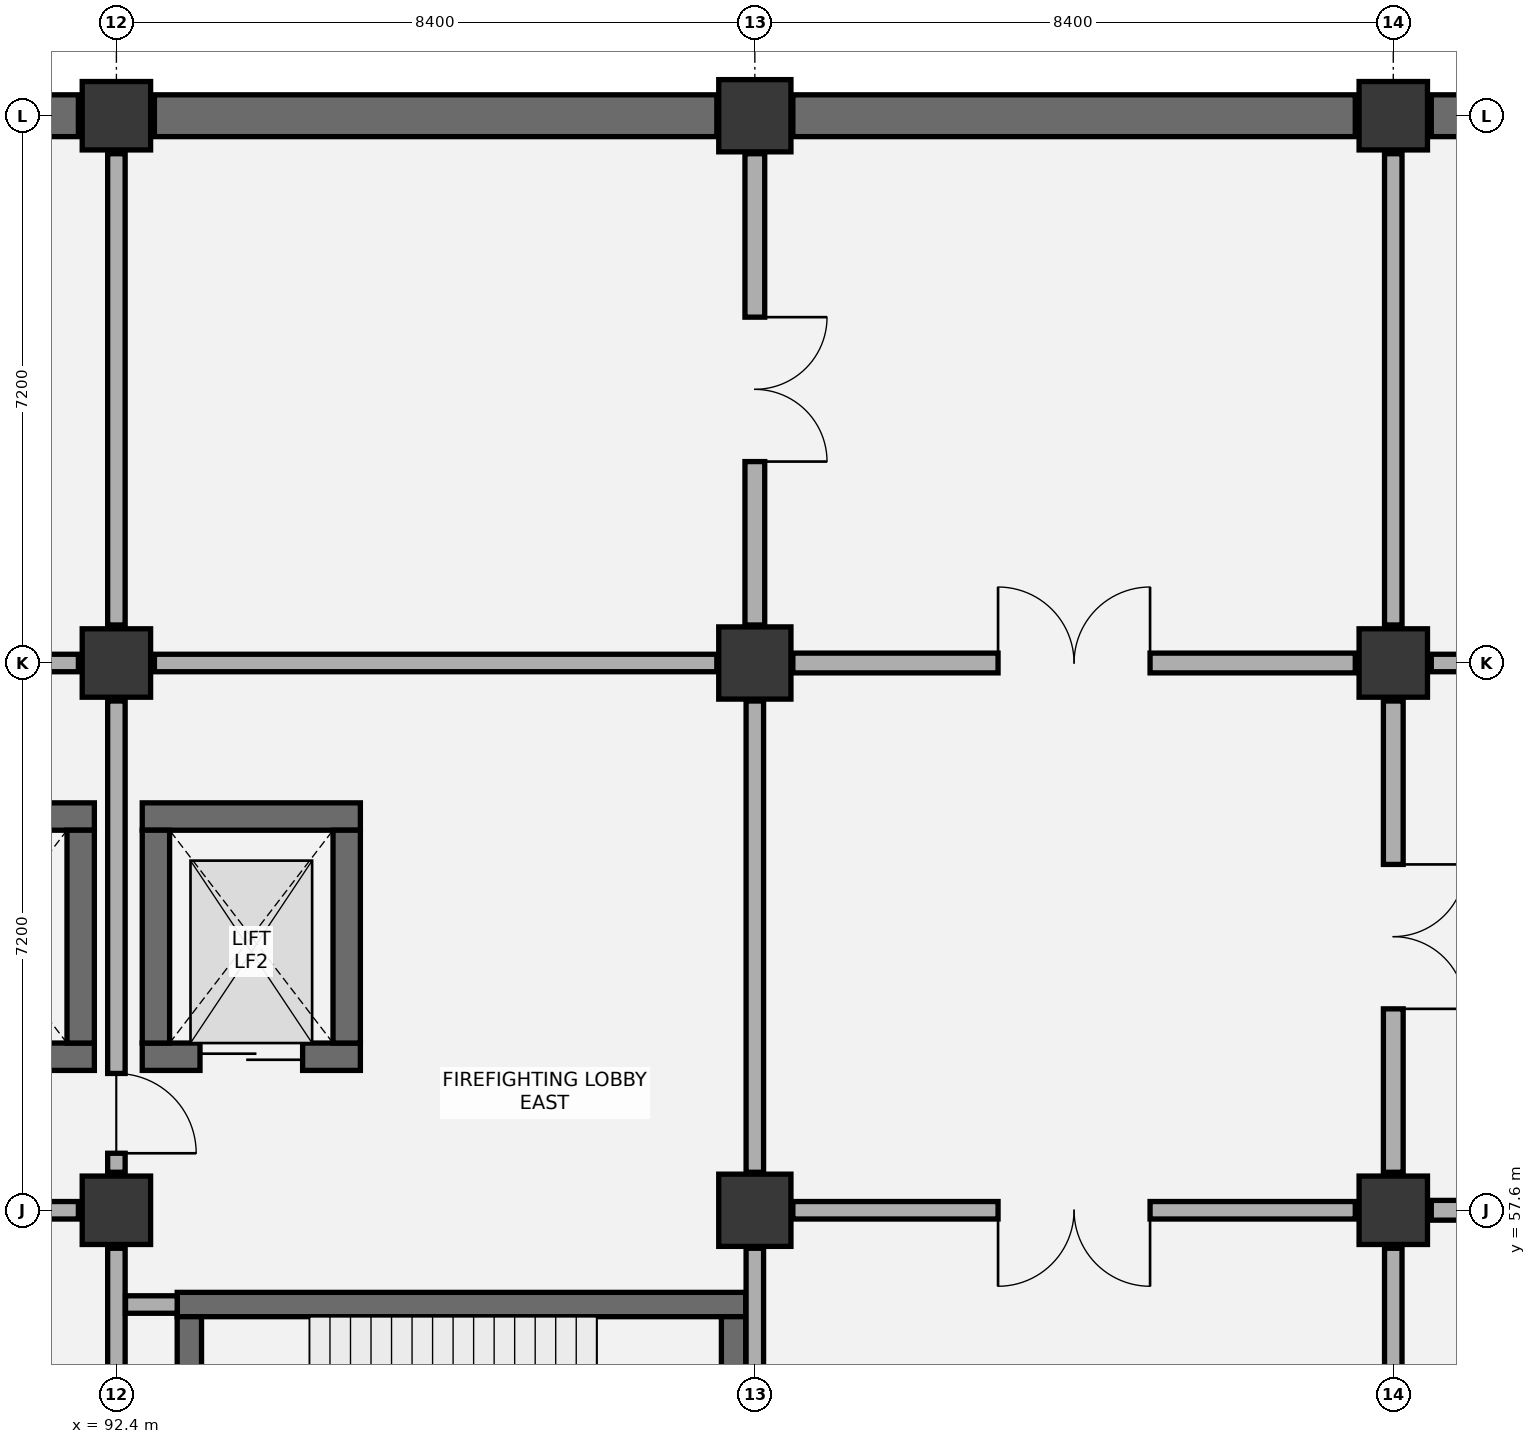
"""IFC4 building model, lengths in metres.
Left out: names, types, materials, properties, quantities, classifications, styles, units other than length and angle.
Written with IfcOpenShell. Run it as: python <this file> out.ifc"""

import sys

from ifc_helpers import new_model, si_unit, direction, frame, frame_2d, origin, origin_2d, place, context, subcontext, project, spatial, rectangle, extrude, element, fill, save


model = new_model("IFC4")
c1 = context("Model", 3, precision=1e-05, world=origin(), true_north=direction((0.0, 1.0)))
c2 = subcontext(c1, "Body", "Model", "MODEL_VIEW")
j1 = project(units=[si_unit("LENGTHUNIT", "METRE"), si_unit("PLANEANGLEUNIT", "RADIAN")], contexts=[c1])
p1 = place(None, origin())
s1 = spatial("IfcSite", under=j1, at=p1, CompositionType="ELEMENT")
p2 = place(p1, origin())
s2 = spatial("IfcBuilding", under=s1, at=p2, CompositionType="ELEMENT")
p3 = place(p2, frame((0.0, 0.0, -9.6)))
s3 = spatial("IfcBuildingStorey", under=s2, at=p3, CompositionType="ELEMENT", Elevation=-9.6)
for number, where, z_axis, x_axis in (
    (1, (92.4, 57.6, 0.0), (0.0, 0.0, 1.0), (1.0, 0.0, 0.0)),
    (2, (92.4, 64.8, 0.0), (0.0, 0.0, 1.0), (1.0, 0.0, 0.0)),
    (3, (92.4, 72.0, 0.0), (0.0, 0.0, 1.0), (1.0, 0.0, 0.0)),
):
    element("IfcColumn", number, at=place(p3, frame(where, z_axis=z_axis, x_axis=x_axis)), inside=s3, PredefinedType="COLUMN", context=c2, shape_type="SweptSolid", body=[
        extrude(rectangle(XDim=0.9, YDim=0.9, at=origin_2d()), origin(), (0.0, 0.0, 1.0), 4.8),
    ])
for number, where, z_axis, x_axis in (
    (4, (100.8, 57.6, 0.0), (0.0, 0.0, 1.0), (1.0, 0.0, 0.0)),
    (5, (100.8, 64.8, 0.0), (0.0, 0.0, 1.0), (1.0, 0.0, 0.0)),
    (6, (100.8, 72.0, 0.0), (0.0, 0.0, 1.0), (1.0, 0.0, 0.0)),
):
    element("IfcColumn", number, at=place(p3, frame(where, z_axis=z_axis, x_axis=x_axis)), inside=s3, PredefinedType="COLUMN", context=c2, shape_type="SweptSolid", body=[
        extrude(rectangle(XDim=0.95, YDim=0.95, at=origin_2d()), origin(), (0.0, 0.0, 1.0), 4.8),
    ])
for number, where, z_axis, x_axis in (
    (7, (109.2, 57.6, 0.0), (0.0, 0.0, 1.0), (1.0, 0.0, 0.0)),
    (8, (109.2, 64.8, 0.0), (0.0, 0.0, 1.0), (1.0, 0.0, 0.0)),
    (9, (109.2, 72.0, 0.0), (0.0, 0.0, 1.0), (1.0, 0.0, 0.0)),
):
    element("IfcColumn", number, at=place(p3, frame(where, z_axis=z_axis, x_axis=x_axis)), inside=s3, PredefinedType="COLUMN", context=c2, shape_type="SweptSolid", body=[
        extrude(rectangle(XDim=0.9, YDim=0.9, at=origin_2d()), origin(), (0.0, 0.0, 1.0), 4.8),
    ])
p4 = place(p3, frame((84.5, 72.0, 0.0), z_axis=(0.0, 0.0, 1.0), x_axis=(1.0, 0.0, 0.0)))
e10 = element("IfcWall", 10, at=p4, inside=s3, PredefinedType="USERDEFINED", context=c2, shape_type="SweptSolid", body=[
    extrude(rectangle(XDim=7.4, YDim=0.55, at=frame_2d((3.7, 0.0))), origin(), (0.0, 0.0, 1.0), 4.4),
])
p5 = place(p3, frame((92.9, 72.0, 0.0), z_axis=(0.0, 0.0, 1.0), x_axis=(1.0, 0.0, 0.0)))
e11 = element("IfcWall", 11, at=p5, inside=s3, PredefinedType="USERDEFINED", context=c2, shape_type="SweptSolid", body=[
    extrude(rectangle(XDim=7.4, YDim=0.55, at=frame_2d((3.7, 0.0))), origin(), (0.0, 0.0, 1.0), 4.4),
])
p6 = place(p3, frame((101.3, 72.0, 0.0), z_axis=(0.0, 0.0, 1.0), x_axis=(1.0, 0.0, 0.0)))
e12 = element("IfcWall", 12, at=p6, inside=s3, PredefinedType="USERDEFINED", context=c2, shape_type="SweptSolid", body=[
    extrude(rectangle(XDim=7.4, YDim=0.55, at=frame_2d((3.7, 0.0))), origin(), (0.0, 0.0, 1.0), 4.4),
])
p7 = place(p3, frame((109.7, 72.0, 0.0), z_axis=(0.0, 0.0, 1.0), x_axis=(1.0, 0.0, 0.0)))
e13 = element("IfcWall", 13, at=p7, inside=s3, PredefinedType="USERDEFINED", context=c2, shape_type="SweptSolid", body=[
    extrude(rectangle(XDim=7.4, YDim=0.55, at=frame_2d((3.7, 0.0))), origin(), (0.0, 0.0, 1.0), 4.4),
])
p8 = place(p3, frame((93.2, 56.36, 0.0), z_axis=(0.0, 0.0, 1.0), x_axis=(1.0, 0.0, 0.0)))
e14 = element("IfcWall", 14, at=p8, inside=s3, PredefinedType="SHEAR", context=c2, shape_type="SweptSolid", body=[
    extrude(rectangle(XDim=7.48, YDim=0.32, at=frame_2d((3.74, 0.0))), origin(), (0.0, 0.0, 1.0), 4.4),
])
for number, where, z_axis, x_axis in (
    (15, (93.36, 52.4, 0.0), (0.0, 0.0, 1.0), (0.0, 1.0, 0.0)),
    (16, (100.52, 52.4, 0.0), (0.0, 0.0, 1.0), (0.0, 1.0, 0.0)),
):
    element("IfcWall", number, at=place(p3, frame(where, z_axis=z_axis, x_axis=x_axis)), inside=s3, PredefinedType="SHEAR", context=c2, shape_type="SweptSolid", body=[
        extrude(rectangle(XDim=3.8, YDim=0.32, at=frame_2d((1.9, 0.0))), origin(), (0.0, 0.0, 1.0), 4.4),
    ])
p9 = place(p3, frame((84.34, 62.78, -0.75), z_axis=(0.0, 0.0, 1.0), x_axis=(1.0, 0.0, 0.0)))
e17 = element("IfcWall", 17, at=p9, inside=s3, PredefinedType="SHEAR", context=c2, shape_type="SweptSolid", body=[
    extrude(rectangle(XDim=7.77, YDim=0.36, at=frame_2d((3.885, 0.0))), origin(), (0.0, 0.0, 1.0), 5.15),
])
p10 = place(p3, frame((89.45, 59.62, -0.75), z_axis=(0.0, 0.0, 1.0), x_axis=(1.0, 0.0, 0.0)))
e18 = element("IfcWall", 18, at=p10, inside=s3, PredefinedType="SHEAR", context=c2, shape_type="SweptSolid", body=[
    extrude(rectangle(XDim=2.66, YDim=0.36, at=frame_2d((1.33, 0.0))), origin(), (0.0, 0.0, 1.0), 5.15),
])
p11 = place(p10, frame((0.78, 0.0, 0.75)))
e19 = element("IfcOpeningElement", 19, at=p11, cuts=e18, PredefinedType="OPENING", context=c2, shape_type="SweptSolid", body=[
    extrude(rectangle(XDim=1.1, YDim=2.15, at=frame_2d((0.55, 1.075))), frame((0.0, 0.19, 0.0), z_axis=(0.0, -1.0, 0.0), x_axis=(1.0, 0.0, 0.0)), (0.0, 0.0, 1.0), 0.38),
])
p12 = place(p3, frame((91.93, 59.8, -0.75), z_axis=(0.0, 0.0, 1.0), x_axis=(0.0, 1.0, 0.0)))
e20 = element("IfcWall", 20, at=p12, inside=s3, PredefinedType="SHEAR", context=c2, shape_type="SweptSolid", body=[
    extrude(rectangle(XDim=2.8, YDim=0.36, at=frame_2d((1.4, 0.0))), origin(), (0.0, 0.0, 1.0), 5.15),
])
p13 = place(p3, frame((92.74, 62.78, -0.75), z_axis=(0.0, 0.0, 1.0), x_axis=(1.0, 0.0, 0.0)))
e21 = element("IfcWall", 21, at=p13, inside=s3, PredefinedType="SHEAR", context=c2, shape_type="SweptSolid", body=[
    extrude(rectangle(XDim=2.87, YDim=0.36, at=frame_2d((1.435, 0.0))), origin(), (0.0, 0.0, 1.0), 5.15),
])
p14 = place(p3, frame((92.74, 59.62, -0.75), z_axis=(0.0, 0.0, 1.0), x_axis=(1.0, 0.0, 0.0)))
e22 = element("IfcWall", 22, at=p14, inside=s3, PredefinedType="SHEAR", context=c2, shape_type="SweptSolid", body=[
    extrude(rectangle(XDim=2.87, YDim=0.36, at=frame_2d((1.435, 0.0))), origin(), (0.0, 0.0, 1.0), 5.15),
])
p15 = place(p14, frame((0.76, 0.0, 0.75)))
e23 = element("IfcOpeningElement", 23, at=p15, cuts=e22, PredefinedType="OPENING", context=c2, shape_type="SweptSolid", body=[
    extrude(rectangle(XDim=1.35, YDim=2.2, at=frame_2d((0.675, 1.1))), frame((0.0, 0.19, 0.0), z_axis=(0.0, -1.0, 0.0), x_axis=(1.0, 0.0, 0.0)), (0.0, 0.0, 1.0), 0.38),
])
for number, where, z_axis, x_axis in (
    (24, (92.92, 59.8, -0.75), (0.0, 0.0, 1.0), (0.0, 1.0, 0.0)),
    (25, (95.43, 59.8, -0.75), (0.0, 0.0, 1.0), (0.0, 1.0, 0.0)),
):
    element("IfcWall", number, at=place(p3, frame(where, z_axis=z_axis, x_axis=x_axis)), inside=s3, PredefinedType="SHEAR", context=c2, shape_type="SweptSolid", body=[
        extrude(rectangle(XDim=2.8, YDim=0.36, at=frame_2d((1.4, 0.0))), origin(), (0.0, 0.0, 1.0), 5.15),
    ])
p16 = place(p3, frame((92.4, 50.9, 0.0), z_axis=(0.0, 0.0, 1.0), x_axis=(0.0, 1.0, 0.0)))
e26 = element("IfcWall", 26, at=p16, inside=s3, PredefinedType="PARTITIONING", context=c2, shape_type="SweptSolid", body=[
    extrude(rectangle(XDim=6.2, YDim=0.23, at=frame_2d((3.1, 0.0))), origin(), (0.0, 0.0, 1.0), 3.595),
])
p17 = place(p16, frame((0.05, 0.0, 0.0)))
e27 = element("IfcOpeningElement", 27, at=p17, cuts=e26, PredefinedType="OPENING", context=c2, shape_type="SweptSolid", body=[
    extrude(rectangle(XDim=1.05, YDim=2.15, at=frame_2d((0.525, 1.075))), frame((0.0, 0.125, 0.0), z_axis=(0.0, -1.0, 0.0), x_axis=(1.0, 0.0, 0.0)), (0.0, 0.0, 1.0), 0.25),
])
p18 = place(p3, frame((84.5, 57.6, 0.0), z_axis=(0.0, 0.0, 1.0), x_axis=(1.0, 0.0, 0.0)))
e28 = element("IfcWall", 28, at=p18, inside=s3, PredefinedType="PARTITIONING", context=c2, shape_type="SweptSolid", body=[
    extrude(rectangle(XDim=7.4, YDim=0.23, at=frame_2d((3.7, 0.0))), origin(), (0.0, 0.0, 1.0), 3.495),
])
p19 = place(p18, frame((2.95, 0.0, 0.0)))
e29 = element("IfcOpeningElement", 29, at=p19, cuts=e28, PredefinedType="OPENING", context=c2, shape_type="SweptSolid", body=[
    extrude(rectangle(XDim=1.5, YDim=2.15, at=frame_2d((0.75, 1.075))), frame((0.0, 0.125, 0.0), z_axis=(0.0, -1.0, 0.0), x_axis=(1.0, 0.0, 0.0)), (0.0, 0.0, 1.0), 0.25),
])
p20 = place(p3, frame((92.4, 58.1, 0.0), z_axis=(0.0, 0.0, 1.0), x_axis=(0.0, 1.0, 0.0)))
e30 = element("IfcWall", 30, at=p20, inside=s3, PredefinedType="PARTITIONING", context=c2, shape_type="SweptSolid", body=[
    extrude(rectangle(XDim=6.2, YDim=0.23, at=frame_2d((3.1, 0.0))), origin(), (0.0, 0.0, 1.0), 3.595),
])
p21 = place(p20, frame((0.25, 0.0, 0.0)))
e31 = element("IfcOpeningElement", 31, at=p21, cuts=e30, PredefinedType="OPENING", context=c2, shape_type="SweptSolid", body=[
    extrude(rectangle(XDim=1.05, YDim=2.15, at=frame_2d((0.525, 1.075))), frame((0.0, 0.125, 0.0), z_axis=(0.0, -1.0, 0.0), x_axis=(1.0, 0.0, 0.0)), (0.0, 0.0, 1.0), 0.25),
])
p22 = place(p3, frame((84.5, 64.8, 0.0), z_axis=(0.0, 0.0, 1.0), x_axis=(1.0, 0.0, 0.0)))
e32 = element("IfcWall", 32, at=p22, inside=s3, PredefinedType="PARTITIONING", context=c2, shape_type="SweptSolid", body=[
    extrude(rectangle(XDim=7.4, YDim=0.23, at=frame_2d((3.7, 0.0))), origin(), (0.0, 0.0, 1.0), 3.495),
])
p23 = place(p3, frame((92.4, 65.3, 0.0), z_axis=(0.0, 0.0, 1.0), x_axis=(0.0, 1.0, 0.0)))
e33 = element("IfcWall", 33, at=p23, inside=s3, PredefinedType="PARTITIONING", context=c2, shape_type="SweptSolid", body=[
    extrude(rectangle(XDim=6.2, YDim=0.23, at=frame_2d((3.1, 0.0))), origin(), (0.0, 0.0, 1.0), 3.595),
])
p24 = place(p3, frame((100.8, 50.9, 0.0), z_axis=(0.0, 0.0, 1.0), x_axis=(0.0, 1.0, 0.0)))
e34 = element("IfcWall", 34, at=p24, inside=s3, PredefinedType="PARTITIONING", context=c2, shape_type="SweptSolid", body=[
    extrude(rectangle(XDim=6.2, YDim=0.23, at=frame_2d((3.1, 0.0))), origin(), (0.0, 0.0, 1.0), 3.595),
])
p25 = place(p3, frame((92.52, 56.36, 0.0), z_axis=(0.0, 0.0, 1.0), x_axis=(1.0, 0.0, 0.0)))
e35 = element("IfcWall", 35, at=p25, inside=s3, PredefinedType="PARTITIONING", context=c2, shape_type="SweptSolid", body=[
    extrude(rectangle(XDim=0.68, YDim=0.23, at=frame_2d((0.34, 0.0))), origin(), (0.0, 0.0, 1.0), 4.4),
])
p26 = place(p3, frame((100.8, 58.1, 0.0), z_axis=(0.0, 0.0, 1.0), x_axis=(0.0, 1.0, 0.0)))
e36 = element("IfcWall", 36, at=p26, inside=s3, PredefinedType="PARTITIONING", context=c2, shape_type="SweptSolid", body=[
    extrude(rectangle(XDim=6.2, YDim=0.23, at=frame_2d((3.1, 0.0))), origin(), (0.0, 0.0, 1.0), 3.595),
])
p27 = place(p3, frame((92.9, 64.8, 0.0), z_axis=(0.0, 0.0, 1.0), x_axis=(1.0, 0.0, 0.0)))
e37 = element("IfcWall", 37, at=p27, inside=s3, PredefinedType="PARTITIONING", context=c2, shape_type="SweptSolid", body=[
    extrude(rectangle(XDim=7.4, YDim=0.23, at=frame_2d((3.7, 0.0))), origin(), (0.0, 0.0, 1.0), 3.495),
])
p28 = place(p3, frame((100.8, 65.3, 0.0), z_axis=(0.0, 0.0, 1.0), x_axis=(0.0, 1.0, 0.0)))
e38 = element("IfcWall", 38, at=p28, inside=s3, PredefinedType="PARTITIONING", context=c2, shape_type="SweptSolid", body=[
    extrude(rectangle(XDim=6.2, YDim=0.26, at=frame_2d((3.1, 0.0))), origin(), (0.0, 0.0, 1.0), 3.595),
])
p29 = place(p28, frame((2.15, 0.0, 0.0)))
e39 = element("IfcOpeningElement", 39, at=p29, cuts=e38, PredefinedType="OPENING", context=c2, shape_type="SweptSolid", body=[
    extrude(rectangle(XDim=1.9, YDim=2.3, at=frame_2d((0.95, 1.15))), frame((0.0, 0.14, 0.0), z_axis=(0.0, -1.0, 0.0), x_axis=(1.0, 0.0, 0.0)), (0.0, 0.0, 1.0), 0.28),
])
p30 = place(p3, frame((109.2, 50.9, 0.0), z_axis=(0.0, 0.0, 1.0), x_axis=(0.0, 1.0, 0.0)))
e40 = element("IfcWall", 40, at=p30, inside=s3, PredefinedType="PARTITIONING", context=c2, shape_type="SweptSolid", body=[
    extrude(rectangle(XDim=6.2, YDim=0.23, at=frame_2d((3.1, 0.0))), origin(), (0.0, 0.0, 1.0), 3.595),
])
p31 = place(p3, frame((101.3, 57.6, 0.0), z_axis=(0.0, 0.0, 1.0), x_axis=(1.0, 0.0, 0.0)))
e41 = element("IfcWall", 41, at=p31, inside=s3, PredefinedType="PARTITIONING", context=c2, shape_type="SweptSolid", body=[
    extrude(rectangle(XDim=7.4, YDim=0.23, at=frame_2d((3.7, 0.0))), origin(), (0.0, 0.0, 1.0), 3.495),
])
p32 = place(p31, frame((2.7, 0.0, 0.0)))
e42 = element("IfcOpeningElement", 42, at=p32, cuts=e41, PredefinedType="OPENING", context=c2, shape_type="SweptSolid", body=[
    extrude(rectangle(XDim=2.0, YDim=2.35, at=frame_2d((1.0, 1.175))), frame((0.0, 0.125, 0.0), z_axis=(0.0, -1.0, 0.0), x_axis=(1.0, 0.0, 0.0)), (0.0, 0.0, 1.0), 0.25),
])
p33 = place(p3, frame((109.2, 58.1, 0.0), z_axis=(0.0, 0.0, 1.0), x_axis=(0.0, 1.0, 0.0)))
e43 = element("IfcWall", 43, at=p33, inside=s3, PredefinedType="PARTITIONING", context=c2, shape_type="SweptSolid", body=[
    extrude(rectangle(XDim=6.2, YDim=0.26, at=frame_2d((3.1, 0.0))), origin(), (0.0, 0.0, 1.0), 3.595),
])
p34 = place(p33, frame((2.15, 0.0, 0.0)))
e44 = element("IfcOpeningElement", 44, at=p34, cuts=e43, PredefinedType="OPENING", context=c2, shape_type="SweptSolid", body=[
    extrude(rectangle(XDim=1.9, YDim=2.3, at=frame_2d((0.95, 1.15))), frame((0.0, 0.14, 0.0), z_axis=(0.0, -1.0, 0.0), x_axis=(1.0, 0.0, 0.0)), (0.0, 0.0, 1.0), 0.28),
])
p35 = place(p3, frame((101.3, 64.8, 0.0), z_axis=(0.0, 0.0, 1.0), x_axis=(1.0, 0.0, 0.0)))
e45 = element("IfcWall", 45, at=p35, inside=s3, PredefinedType="PARTITIONING", context=c2, shape_type="SweptSolid", body=[
    extrude(rectangle(XDim=7.4, YDim=0.26, at=frame_2d((3.7, 0.0))), origin(), (0.0, 0.0, 1.0), 3.495),
])
p36 = place(p35, frame((2.7, 0.0, 0.0)))
e46 = element("IfcOpeningElement", 46, at=p36, cuts=e45, PredefinedType="OPENING", context=c2, shape_type="SweptSolid", body=[
    extrude(rectangle(XDim=2.0, YDim=2.35, at=frame_2d((1.0, 1.175))), frame((0.0, 0.14, 0.0), z_axis=(0.0, -1.0, 0.0), x_axis=(1.0, 0.0, 0.0)), (0.0, 0.0, 1.0), 0.28),
])
p37 = place(p3, frame((109.2, 65.3, 0.0), z_axis=(0.0, 0.0, 1.0), x_axis=(0.0, 1.0, 0.0)))
e47 = element("IfcWall", 47, at=p37, inside=s3, PredefinedType="PARTITIONING", context=c2, shape_type="SweptSolid", body=[
    extrude(rectangle(XDim=6.2, YDim=0.23, at=frame_2d((3.1, 0.0))), origin(), (0.0, 0.0, 1.0), 3.595),
])
p38 = place(p3, frame((109.7, 57.6, 0.0), z_axis=(0.0, 0.0, 1.0), x_axis=(1.0, 0.0, 0.0)))
e48 = element("IfcWall", 48, at=p38, inside=s3, PredefinedType="PARTITIONING", context=c2, shape_type="SweptSolid", body=[
    extrude(rectangle(XDim=7.4, YDim=0.26, at=frame_2d((3.7, 0.0))), origin(), (0.0, 0.0, 1.0), 3.495),
])
p39 = place(p38, frame((2.7, 0.0, 0.0)))
e49 = element("IfcOpeningElement", 49, at=p39, cuts=e48, PredefinedType="OPENING", context=c2, shape_type="SweptSolid", body=[
    extrude(rectangle(XDim=2.0, YDim=2.35, at=frame_2d((1.0, 1.175))), frame((0.0, 0.14, 0.0), z_axis=(0.0, -1.0, 0.0), x_axis=(1.0, 0.0, 0.0)), (0.0, 0.0, 1.0), 0.28),
])
p40 = place(p3, frame((109.7, 64.8, 0.0), z_axis=(0.0, 0.0, 1.0), x_axis=(1.0, 0.0, 0.0)))
e50 = element("IfcWall", 50, at=p40, inside=s3, PredefinedType="PARTITIONING", context=c2, shape_type="SweptSolid", body=[
    extrude(rectangle(XDim=7.4, YDim=0.23, at=frame_2d((3.7, 0.0))), origin(), (0.0, 0.0, 1.0), 3.495),
])
p41 = place(p15, origin())
e51 = element("IfcDoor", 51, at=p41, inside=s3, OperationType="DOUBLE_DOOR_SLIDING", PredefinedType="DOOR", context=c2, shape_type="SweptSolid", body=[
    extrude(rectangle(XDim=1.35, YDim=2.2, at=frame_2d((0.675, 1.1))), frame((0.0, 0.025, 0.0), z_axis=(0.0, -1.0, 0.0), x_axis=(1.0, 0.0, 0.0)), (0.0, 0.0, 1.0), 0.05),
])
fill(e23, e51)
p42 = place(p21, frame((1.05, 0.0, 0.0), z_axis=(0.0, 0.0, 1.0), x_axis=(-1.0, 0.0, 0.0)))
e52 = element("IfcDoor", 52, at=p42, inside=s3, OperationType="SINGLE_SWING_RIGHT", PredefinedType="DOOR", context=c2, shape_type="SweptSolid", body=[
    extrude(rectangle(XDim=1.05, YDim=2.15, at=frame_2d((0.525, 1.075))), frame((0.0, 0.025, 0.0), z_axis=(0.0, -1.0, 0.0), x_axis=(1.0, 0.0, 0.0)), (0.0, 0.0, 1.0), 0.05),
])
fill(e31, e52)
p43 = place(p29, frame((1.9, 0.0, 0.0), z_axis=(0.0, 0.0, 1.0), x_axis=(-1.0, 0.0, 0.0)))
e53 = element("IfcDoor", 53, at=p43, inside=s3, OperationType="DOUBLE_DOOR_SINGLE_SWING", PredefinedType="DOOR", context=c2, shape_type="SweptSolid", body=[
    extrude(rectangle(XDim=1.9, YDim=2.3, at=frame_2d((0.95, 1.15))), frame((0.0, 0.025, 0.0), z_axis=(0.0, -1.0, 0.0), x_axis=(1.0, 0.0, 0.0)), (0.0, 0.0, 1.0), 0.05),
])
fill(e39, e53)
p44 = place(p32, frame((2.0, 0.0, 0.0), z_axis=(0.0, 0.0, 1.0), x_axis=(-1.0, 0.0, 0.0)))
e54 = element("IfcDoor", 54, at=p44, inside=s3, OperationType="DOUBLE_DOOR_SINGLE_SWING", PredefinedType="DOOR", context=c2, shape_type="SweptSolid", body=[
    extrude(rectangle(XDim=2.0, YDim=2.35, at=frame_2d((1.0, 1.175))), frame((0.0, 0.025, 0.0), z_axis=(0.0, -1.0, 0.0), x_axis=(1.0, 0.0, 0.0)), (0.0, 0.0, 1.0), 0.05),
])
fill(e42, e54)
p45 = place(p34, frame((1.9, 0.0, 0.0), z_axis=(0.0, 0.0, 1.0), x_axis=(-1.0, 0.0, 0.0)))
e55 = element("IfcDoor", 55, at=p45, inside=s3, OperationType="DOUBLE_DOOR_SINGLE_SWING", PredefinedType="DOOR", context=c2, shape_type="SweptSolid", body=[
    extrude(rectangle(XDim=1.9, YDim=2.3, at=frame_2d((0.95, 1.15))), frame((0.0, 0.025, 0.0), z_axis=(0.0, -1.0, 0.0), x_axis=(1.0, 0.0, 0.0)), (0.0, 0.0, 1.0), 0.05),
])
fill(e44, e55)
p46 = place(p36, origin())
e56 = element("IfcDoor", 56, at=p46, inside=s3, OperationType="DOUBLE_DOOR_SINGLE_SWING", PredefinedType="DOOR", context=c2, shape_type="SweptSolid", body=[
    extrude(rectangle(XDim=2.0, YDim=2.35, at=frame_2d((1.0, 1.175))), frame((0.0, 0.025, 0.0), z_axis=(0.0, -1.0, 0.0), x_axis=(1.0, 0.0, 0.0)), (0.0, 0.0, 1.0), 0.05),
])
fill(e46, e56)
save(model, sys.argv[1])
